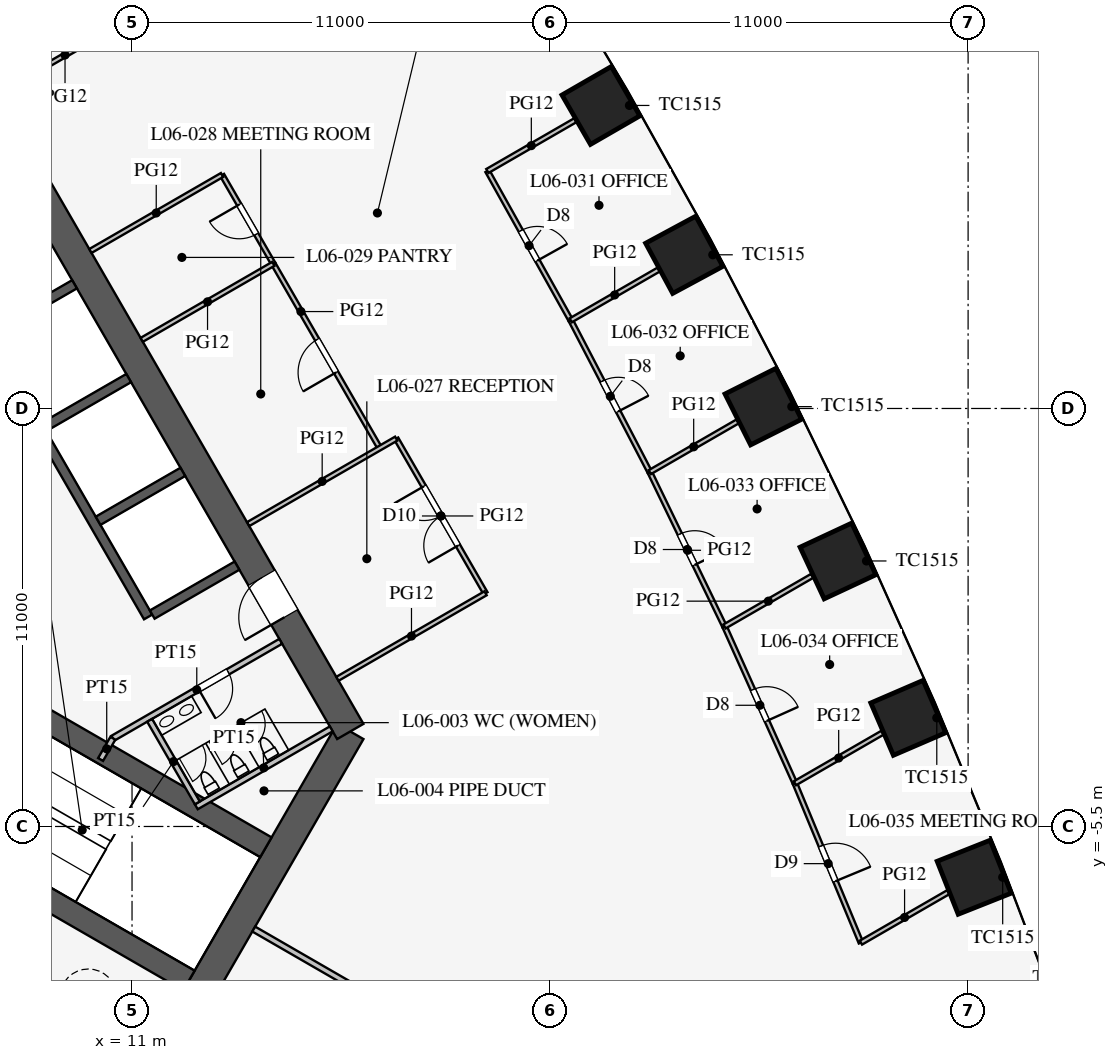
"""IFC4 building model, lengths in metres.
Left out: names, types, materials, properties, quantities, classifications, styles, units other than length and angle.
Written with IfcOpenShell. Run it as: python <this file> out.ifc"""

import sys

from ifc_helpers import new_model, si_unit, direction, frame, frame_2d, origin, origin_2d, place, context, subcontext, project, spatial, rectangle, extrude, element, fill, save


model = new_model("IFC4")
c1 = context("Model", 3, precision=1e-05, world=origin(), true_north=direction((0.0, 1.0)))
c2 = subcontext(c1, "Body", "Model", "MODEL_VIEW")
j1 = project(units=[si_unit("LENGTHUNIT", "METRE"), si_unit("PLANEANGLEUNIT", "RADIAN")], contexts=[c1])
p1 = place(None, origin())
s1 = spatial("IfcSite", under=j1, at=p1, CompositionType="ELEMENT")
p2 = place(p1, origin())
s2 = spatial("IfcBuilding", under=s1, at=p2, CompositionType="ELEMENT")
p3 = place(p2, frame((0.0, 0.0, 29.1)))
s3 = spatial("IfcBuildingStorey", under=s2, at=p3, CompositionType="ELEMENT", Elevation=29.1)
for number, where, z_axis, x_axis in (
    (1, (33.16, -6.836, 0.0), (0.0, 0.0, 1.0), (-0.369, 0.929, 0.0)),
    (2, (31.426, -2.641, 0.0), (0.0, 0.0, 1.0), (-0.396, 0.918, 0.0)),
    (3, (29.576, 1.487, 0.0), (0.0, 0.0, 1.0), (-0.423, 0.906, 0.0)),
    (4, (27.611, 5.549, 0.0), (0.0, 0.0, 1.0), (-0.449, 0.894, 0.0)),
    (5, (25.531, 9.544, 0.0), (0.0, 0.0, 1.0), (-0.475, 0.88, 0.0)),
    (6, (23.338, 13.474, 0.0), (0.0, 0.0, 1.0), (-0.5, 0.866, 0.0)),
):
    element("IfcColumn", number, at=place(p3, frame(where, z_axis=z_axis, x_axis=x_axis)), inside=s3, PredefinedType="COLUMN", context=c2, shape_type="SweptSolid", body=[
        extrude(rectangle(XDim=1.5, YDim=1.5, at=origin_2d()), origin(), (0.0, 0.0, 1.0), 4.2),
    ])
p4 = place(p3, frame((10.97, -13.0, 0.0), z_axis=(0.0, 0.0, 1.0), x_axis=(0.499995765644, 0.866027848477, 0.0)))
e7 = element("IfcWall", 7, at=p4, inside=s3, PredefinedType="SHEAR", context=c2, shape_type="SweptSolid", body=[
    extrude(rectangle(XDim=11.547, YDim=0.8, at=frame_2d((5.773, 0.0))), origin(), (0.0, 0.0, 1.0), 4.2),
])
p5 = place(p3, frame((16.743, -3.0, 0.0), z_axis=(0.0, 0.0, 1.0), x_axis=(-0.500002442456, 0.866023993627, 0.0)))
e8 = element("IfcWall", 8, at=p5, inside=s3, PredefinedType="SHEAR", context=c2, shape_type="SweptSolid", body=[
    extrude(rectangle(XDim=21.939, YDim=0.8, at=frame_2d((10.97, 0.0))), origin(), (0.0, 0.0, 1.0), 4.2),
])
p6 = place(p5, frame((17.27, 0.0, 0.0)))
e9 = element("IfcOpeningElement", 9, at=p6, cuts=e8, PredefinedType="OPENING", context=c2, shape_type="SweptSolid", body=[
    extrude(rectangle(XDim=1.2, YDim=2.1, at=frame_2d((0.6, 1.05))), frame((0.0, 0.41, 0.0), z_axis=(0.0, -1.0, 0.0), x_axis=(1.0, 0.0, 0.0)), (0.0, 0.0, 1.0), 0.82),
])
p7 = place(p5, frame((3.47, 0.0, 0.0)))
e10 = element("IfcOpeningElement", 10, at=p7, cuts=e8, PredefinedType="OPENING", context=c2, shape_type="SweptSolid", body=[
    extrude(rectangle(XDim=1.2, YDim=2.1, at=frame_2d((0.6, 1.05))), frame((0.0, 0.41, 0.0), z_axis=(0.0, -1.0, 0.0), x_axis=(1.0, 0.0, 0.0)), (0.0, 0.0, 1.0), 0.82),
])
p8 = place(p3, frame((11.424, 0.014, 0.0), z_axis=(0.0, 0.0, 1.0), x_axis=(-0.500001763848, 0.866024385424, 0.0)))
e11 = element("IfcWall", 11, at=p8, inside=s3, PredefinedType="SHEAR", context=c2, shape_type="SweptSolid", body=[
    extrude(rectangle(XDim=11.4, YDim=0.25, at=frame_2d((5.7, 0.0))), origin(), (0.0, 0.0, 1.0), 4.2),
])
for number, where, z_axis, x_axis in (
    (12, (11.532, 0.076, 0.0), (0.0, 0.0, 1.0), (0.866, 0.5, 0.0)),
    (13, (10.107, 2.544, 0.0), (0.0, 0.0, 1.0), (0.866, 0.5, 0.0)),
    (14, (8.682, 5.012, 0.0), (0.0, 0.0, 1.0), (0.866, 0.5, 0.0)),
    (15, (7.257, 7.481, 0.0), (0.0, 0.0, 1.0), (0.866, 0.5, 0.0)),
):
    element("IfcWall", number, at=place(p3, frame(where, z_axis=z_axis, x_axis=x_axis)), inside=s3, PredefinedType="SHEAR", context=c2, shape_type="SweptSolid", body=[
        extrude(rectangle(XDim=2.575, YDim=0.25, at=frame_2d((1.288, 0.0))), origin(), (0.0, 0.0, 1.0), 4.2),
    ])
for number, where, z_axis, x_axis in (
    (16, (4.638, -5.016, 0.0), (0.0, 0.0, 1.0), (0.866, -0.5, 0.0)),
    (17, (6.663, -1.509, 0.0), (0.0, 0.0, 1.0), (0.866, -0.5, 0.0)),
):
    element("IfcWall", number, at=place(p3, frame(where, z_axis=z_axis, x_axis=x_axis)), inside=s3, PredefinedType="SHEAR", context=c2, shape_type="SweptSolid", body=[
        extrude(rectangle(XDim=9.075, YDim=0.6, at=frame_2d((4.538, 0.0))), origin(), (0.0, 0.0, 1.0), 4.2),
    ])
p9 = place(p3, frame((10.495, -3.178, 0.0), z_axis=(0.0, 0.0, 1.0), x_axis=(0.86602216432, 0.500005610874, 0.0)))
e18 = element("IfcWall", 18, at=p9, inside=s3, PredefinedType="PARTITIONING", context=c2, shape_type="SweptSolid", body=[
    extrude(rectangle(XDim=5.1, YDim=0.15, at=frame_2d((2.55, 0.0))), origin(), (0.0, 0.0, 1.0), 4.0),
])
p10 = place(p9, frame((2.6, 0.0, 0.0)))
e19 = element("IfcOpeningElement", 19, at=p10, cuts=e18, PredefinedType="OPENING", context=c2, shape_type="SweptSolid", body=[
    extrude(rectangle(XDim=0.9, YDim=2.1, at=frame_2d((0.45, 1.05))), frame((0.0, 0.085, 0.0), z_axis=(0.0, -1.0, 0.0), x_axis=(1.0, 0.0, 0.0)), (0.0, 0.0, 1.0), 0.17),
])
p11 = place(p3, frame((10.495, -3.178, 0.0), z_axis=(0.0, 0.0, 1.0), x_axis=(-0.499842556608, -0.866116284689, 0.0)))
e20 = element("IfcWall", 20, at=p11, inside=s3, PredefinedType="PARTITIONING", context=c2, shape_type="SweptSolid", body=[
    extrude(rectangle(XDim=0.645, YDim=0.15, at=frame_2d((0.323, 0.0))), origin(), (0.0, 0.0, 1.0), 4.0),
])
p12 = place(p3, frame((12.691, -4.982, 0.0), z_axis=(0.0, 0.0, 1.0), x_axis=(0.8660249478, 0.500000789788, 0.0)))
e21 = element("IfcWall", 21, at=p12, inside=s3, PredefinedType="PARTITIONING", context=c2, shape_type="SweptSolid", body=[
    extrude(rectangle(XDim=4.1, YDim=0.15, at=frame_2d((2.05, 0.0))), origin(), (0.0, 0.0, 1.0), 4.0),
])
p13 = place(p3, frame((11.464, -2.706, 0.0), z_axis=(0.0, 0.0, 1.0), x_axis=(0.50001992892, -0.866013897511, 0.0)))
e22 = element("IfcWall", 22, at=p13, inside=s3, PredefinedType="PARTITIONING", context=c2, shape_type="SweptSolid", body=[
    extrude(rectangle(XDim=2.51, YDim=0.15, at=frame_2d((1.255, 0.0))), origin(), (0.0, 0.0, 1.0), 4.0),
])
p14 = place(p3, frame((14.203, -8.2, 0.0), z_axis=(0.0, 0.0, 1.0), x_axis=(0.866024965723, -0.500000758745, 0.0)))
e23 = element("IfcWall", 23, at=p14, inside=s3, PredefinedType="PARTITIONING", context=c2, shape_type="SweptSolid", body=[
    extrude(rectangle(XDim=18.25, YDim=0.15, at=frame_2d((9.125, 0.0))), origin(), (0.0, 0.0, 1.0), 2.3),
])
p15 = place(p3, frame((14.719, 9.306, 0.0), z_axis=(0.0, 0.0, 1.0), x_axis=(-0.4999416173, 0.866059108428, 0.0)))
e24 = element("IfcWall", 24, at=p15, inside=s3, PredefinedType="PARTITIONING", context=c2, shape_type="SweptSolid", body=[
    extrude(rectangle(XDim=2.7, YDim=0.12, at=frame_2d((1.35, 0.0))), origin(), (0.0, 0.0, 1.0), 2.9),
])
p16 = place(p15, frame((0.9, 0.0, 0.15)))
e25 = element("IfcOpeningElement", 25, at=p16, cuts=e24, PredefinedType="OPENING", context=c2, shape_type="SweptSolid", body=[
    extrude(rectangle(XDim=0.9, YDim=2.1, at=frame_2d((0.45, 1.05))), frame((0.0, 0.07, 0.0), z_axis=(0.0, -1.0, 0.0), x_axis=(1.0, 0.0, 0.0)), (0.0, 0.0, 1.0), 0.14),
])
p17 = place(p3, frame((17.519, 4.457, 0.0), z_axis=(0.0, 0.0, 1.0), x_axis=(-0.500016814911, 0.866015695474, 0.0)))
e26 = element("IfcWall", 26, at=p17, inside=s3, PredefinedType="PARTITIONING", context=c2, shape_type="SweptSolid", body=[
    extrude(rectangle(XDim=5.6, YDim=0.12, at=frame_2d((2.8, 0.0))), origin(), (0.0, 0.0, 1.0), 2.9),
])
p18 = place(p17, frame((2.3, 0.0, 0.15)))
e27 = element("IfcOpeningElement", 27, at=p18, cuts=e26, PredefinedType="OPENING", context=c2, shape_type="SweptSolid", body=[
    extrude(rectangle(XDim=1.0, YDim=2.1, at=frame_2d((0.5, 1.05))), frame((0.0, 0.07, 0.0), z_axis=(0.0, -1.0, 0.0), x_axis=(1.0, 0.0, 0.0)), (0.0, 0.0, 1.0), 0.14),
])
p19 = place(p3, frame((20.302, 0.636, 0.0), z_axis=(0.0, 0.0, 1.0), x_axis=(-0.499977259774, 0.866038532462, 0.0)))
e28 = element("IfcWall", 28, at=p19, inside=s3, PredefinedType="PARTITIONING", context=c2, shape_type="SweptSolid", body=[
    extrude(rectangle(XDim=4.7, YDim=0.12, at=frame_2d((2.35, 0.0))), origin(), (0.0, 0.0, 1.0), 2.9),
])
p20 = place(p19, frame((1.45, 0.0, 0.15)))
e29 = element("IfcOpeningElement", 29, at=p20, cuts=e28, PredefinedType="OPENING", context=c2, shape_type="SweptSolid", body=[
    extrude(rectangle(XDim=1.8, YDim=2.1, at=frame_2d((0.9, 1.05))), frame((0.0, 0.07, 0.0), z_axis=(0.0, -1.0, 0.0), x_axis=(1.0, 0.0, 0.0)), (0.0, 0.0, 1.0), 0.14),
])
for number, where, z_axis, x_axis in (
    (30, (11.255, 7.306, 0.0), (0.0, 0.0, 1.0), (0.866, 0.5, 0.0)),
    (31, (9.905, 9.645, 0.0), (0.0, 0.0, 1.0), (0.866, 0.5, 0.0)),
    (32, (7.505, 13.802, 0.0), (0.0, 0.0, 1.0), (0.866, 0.5, 0.0)),
):
    element("IfcWall", number, at=place(p3, frame(where, z_axis=z_axis, x_axis=x_axis)), inside=s3, PredefinedType="PARTITIONING", context=c2, shape_type="SweptSolid", body=[
        extrude(rectangle(XDim=4.0, YDim=0.12, at=frame_2d((2.0, 0.0))), origin(), (0.0, 0.0, 1.0), 2.9),
    ])
p21 = place(p3, frame((14.055, 2.457, 0.0), z_axis=(0.0, 0.0, 1.0), x_axis=(0.866031096941, 0.499990139034, 0.0)))
e33 = element("IfcWall", 33, at=p21, inside=s3, PredefinedType="PARTITIONING", context=c2, shape_type="SweptSolid", body=[
    extrude(rectangle(XDim=4.5, YDim=0.12, at=frame_2d((2.25, 0.0))), origin(), (0.0, 0.0, 1.0), 2.9),
])
p22 = place(p3, frame((16.405, -1.614, 0.0), z_axis=(0.0, 0.0, 1.0), x_axis=(0.866017533419, 0.500013631625, 0.0)))
e34 = element("IfcWall", 34, at=p22, inside=s3, PredefinedType="PARTITIONING", context=c2, shape_type="SweptSolid", body=[
    extrude(rectangle(XDim=4.5, YDim=0.12, at=frame_2d((2.25, 0.0))), origin(), (0.0, 0.0, 1.0), 2.9),
])
p23 = place(p3, frame((26.591, -0.236, 0.0), z_axis=(0.0, 0.0, 1.0), x_axis=(-0.435857917556, 0.900015486369, 0.0)))
e35 = element("IfcWall", 35, at=p23, inside=s3, PredefinedType="PARTITIONING", context=c2, shape_type="SweptSolid", body=[
    extrude(rectangle(XDim=4.512, YDim=0.12, at=frame_2d((2.256, 0.0))), origin(), (0.0, 0.0, 1.0), 2.9),
])
p24 = place(p23, frame((1.8, 0.0, 0.15)))
e36 = element("IfcOpeningElement", 36, at=p24, cuts=e35, PredefinedType="OPENING", context=c2, shape_type="SweptSolid", body=[
    extrude(rectangle(XDim=0.9, YDim=2.1, at=frame_2d((0.45, 1.05))), frame((0.0, 0.07, 0.0), z_axis=(0.0, -1.0, 0.0), x_axis=(1.0, 0.0, 0.0)), (0.0, 0.0, 1.0), 0.14),
])
p25 = place(p3, frame((28.443, -4.363, 0.0), z_axis=(0.0, 0.0, 1.0), x_axis=(-0.409495979977, 0.912311921649, 0.0)))
e37 = element("IfcWall", 37, at=p25, inside=s3, PredefinedType="PARTITIONING", context=c2, shape_type="SweptSolid", body=[
    extrude(rectangle(XDim=4.523, YDim=0.12, at=frame_2d((2.262, 0.0))), origin(), (0.0, 0.0, 1.0), 2.9),
])
p26 = place(p25, frame((1.8, 0.0, 0.15)))
e38 = element("IfcOpeningElement", 38, at=p26, cuts=e37, PredefinedType="OPENING", context=c2, shape_type="SweptSolid", body=[
    extrude(rectangle(XDim=0.9, YDim=2.1, at=frame_2d((0.45, 1.05))), frame((0.0, 0.07, 0.0), z_axis=(0.0, -1.0, 0.0), x_axis=(1.0, 0.0, 0.0)), (0.0, 0.0, 1.0), 0.14),
])
p27 = place(p3, frame((30.179, -8.557, 0.0), z_axis=(0.0, 0.0, 1.0), x_axis=(-0.382594071331, 0.923916542001, 0.0)))
e39 = element("IfcWall", 39, at=p27, inside=s3, PredefinedType="PARTITIONING", context=c2, shape_type="SweptSolid", body=[
    extrude(rectangle(XDim=4.539, YDim=0.12, at=frame_2d((2.27, 0.0))), origin(), (0.0, 0.0, 1.0), 2.9),
])
p28 = place(p27, frame((1.75, 0.0, 0.15)))
e40 = element("IfcOpeningElement", 40, at=p28, cuts=e39, PredefinedType="OPENING", context=c2, shape_type="SweptSolid", body=[
    extrude(rectangle(XDim=1.0, YDim=2.1, at=frame_2d((0.5, 1.05))), frame((0.0, 0.07, 0.0), z_axis=(0.0, -1.0, 0.0), x_axis=(1.0, 0.0, 0.0)), (0.0, 0.0, 1.0), 0.14),
])
p29 = place(p3, frame((22.544, 7.82, 0.0), z_axis=(0.0, 0.0, 1.0), x_axis=(-0.487373854787, 0.873193406795, 0.0)))
e41 = element("IfcWall", 41, at=p29, inside=s3, PredefinedType="PARTITIONING", context=c2, shape_type="SweptSolid", body=[
    extrude(rectangle(XDim=4.5, YDim=0.12, at=frame_2d((2.25, 0.0))), origin(), (0.0, 0.0, 1.0), 2.9),
])
p30 = place(p29, frame((1.8, 0.0, 0.15)))
e42 = element("IfcOpeningElement", 42, at=p30, cuts=e41, PredefinedType="OPENING", context=c2, shape_type="SweptSolid", body=[
    extrude(rectangle(XDim=0.9, YDim=2.1, at=frame_2d((0.45, 1.05))), frame((0.0, 0.07, 0.0), z_axis=(0.0, -1.0, 0.0), x_axis=(1.0, 0.0, 0.0)), (0.0, 0.0, 1.0), 0.14),
])
p31 = place(p3, frame((24.624, 3.824, 0.0), z_axis=(0.0, 0.0, 1.0), x_axis=(-0.461810056307, 0.886978845235, 0.0)))
e43 = element("IfcWall", 43, at=p31, inside=s3, PredefinedType="PARTITIONING", context=c2, shape_type="SweptSolid", body=[
    extrude(rectangle(XDim=4.504, YDim=0.12, at=frame_2d((2.252, 0.0))), origin(), (0.0, 0.0, 1.0), 2.9),
])
p32 = place(p31, frame((1.8, 0.0, 0.15)))
e44 = element("IfcOpeningElement", 44, at=p32, cuts=e43, PredefinedType="OPENING", context=c2, shape_type="SweptSolid", body=[
    extrude(rectangle(XDim=0.9, YDim=2.1, at=frame_2d((0.45, 1.05))), frame((0.0, 0.07, 0.0), z_axis=(0.0, -1.0, 0.0), x_axis=(1.0, 0.0, 0.0)), (0.0, 0.0, 1.0), 0.14),
])
p33 = place(p3, frame((20.351, 11.749, 0.0), z_axis=(0.0, 0.0, 1.0), x_axis=(0.865989150234, 0.500062787734, 0.0)))
e45 = element("IfcWall", 45, at=p33, inside=s3, PredefinedType="PARTITIONING", context=c2, shape_type="SweptSolid", body=[
    extrude(rectangle(XDim=2.67, YDim=0.12, at=frame_2d((1.335, 0.0))), origin(), (0.0, 0.0, 1.0), 2.9),
])
p34 = place(p3, frame((26.591, -0.236, 0.0), z_axis=(0.0, 0.0, 1.0), x_axis=(0.866023818221, 0.500002746266, 0.0)))
e46 = element("IfcWall", 46, at=p34, inside=s3, PredefinedType="PARTITIONING", context=c2, shape_type="SweptSolid", body=[
    extrude(rectangle(XDim=2.664, YDim=0.12, at=frame_2d((1.332, 0.0))), origin(), (0.0, 0.0, 1.0), 2.9),
])
p35 = place(p3, frame((28.443, -4.363, 0.0), z_axis=(0.0, 0.0, 1.0), x_axis=(0.866031171652, 0.499990009627, 0.0)))
e47 = element("IfcWall", 47, at=p35, inside=s3, PredefinedType="PARTITIONING", context=c2, shape_type="SweptSolid", body=[
    extrude(rectangle(XDim=2.659, YDim=0.12, at=frame_2d((1.33, 0.0))), origin(), (0.0, 0.0, 1.0), 2.9),
])
p36 = place(p3, frame((30.179, -8.557, 0.0), z_axis=(0.0, 0.0, 1.0), x_axis=(0.866026229868, 0.499998569178, 0.0)))
e48 = element("IfcWall", 48, at=p36, inside=s3, PredefinedType="PARTITIONING", context=c2, shape_type="SweptSolid", body=[
    extrude(rectangle(XDim=2.653, YDim=0.12, at=frame_2d((1.327, 0.0))), origin(), (0.0, 0.0, 1.0), 2.9),
])
p37 = place(p3, frame((22.544, 7.82, 0.0), z_axis=(0.0, 0.0, 1.0), x_axis=(0.866022619654, 0.500004822225, 0.0)))
e49 = element("IfcWall", 49, at=p37, inside=s3, PredefinedType="PARTITIONING", context=c2, shape_type="SweptSolid", body=[
    extrude(rectangle(XDim=2.669, YDim=0.12, at=frame_2d((1.335, 0.0))), origin(), (0.0, 0.0, 1.0), 2.9),
])
p38 = place(p3, frame((24.624, 3.824, 0.0), z_axis=(0.0, 0.0, 1.0), x_axis=(0.866020974757, 0.500007671222, 0.0)))
e50 = element("IfcWall", 50, at=p38, inside=s3, PredefinedType="PARTITIONING", context=c2, shape_type="SweptSolid", body=[
    extrude(rectangle(XDim=2.667, YDim=0.12, at=frame_2d((1.334, 0.0))), origin(), (0.0, 0.0, 1.0), 2.9),
])
p39 = place(p10, frame((0.9, 0.0, 0.0), z_axis=(0.0, 0.0, 1.0), x_axis=(-1.0, 0.0, 0.0)))
e51 = element("IfcDoor", 51, at=p39, inside=s3, OperationType="SINGLE_SWING_RIGHT", PredefinedType="DOOR", context=c2, shape_type="SweptSolid", body=[
    extrude(rectangle(XDim=0.9, YDim=2.1, at=frame_2d((0.45, 1.05))), frame((0.0, 0.025, 0.0), z_axis=(0.0, -1.0, 0.0), x_axis=(1.0, 0.0, 0.0)), (0.0, 0.0, 1.0), 0.05),
])
fill(e19, e51)
p40 = place(p7, origin())
e52 = element("IfcDoor", 52, at=p40, inside=s3, OperationType="SINGLE_SWING_LEFT", PredefinedType="DOOR", context=c2, shape_type="SweptSolid", body=[
    extrude(rectangle(XDim=1.2, YDim=2.1, at=frame_2d((0.6, 1.05))), frame((0.0, 0.025, 0.0), z_axis=(0.0, -1.0, 0.0), x_axis=(1.0, 0.0, 0.0)), (0.0, 0.0, 1.0), 0.05),
])
fill(e10, e52)
p41 = place(p20, origin())
e53 = element("IfcDoor", 53, at=p41, inside=s3, OperationType="DOUBLE_DOOR_SINGLE_SWING", PredefinedType="DOOR", context=c2, shape_type="SweptSolid", body=[
    extrude(rectangle(XDim=1.8, YDim=2.1, at=frame_2d((0.9, 1.05))), frame((0.0, 0.025, 0.0), z_axis=(0.0, -1.0, 0.0), x_axis=(1.0, 0.0, 0.0)), (0.0, 0.0, 1.0), 0.05),
])
fill(e29, e53)
p42 = place(p18, origin())
e54 = element("IfcDoor", 54, at=p42, inside=s3, OperationType="SINGLE_SWING_LEFT", PredefinedType="DOOR", context=c2, shape_type="SweptSolid", body=[
    extrude(rectangle(XDim=1.0, YDim=2.1, at=frame_2d((0.5, 1.05))), frame((0.0, 0.025, 0.0), z_axis=(0.0, -1.0, 0.0), x_axis=(1.0, 0.0, 0.0)), (0.0, 0.0, 1.0), 0.05),
])
fill(e27, e54)
p43 = place(p16, origin())
e55 = element("IfcDoor", 55, at=p43, inside=s3, OperationType="SINGLE_SWING_RIGHT", PredefinedType="DOOR", context=c2, shape_type="SweptSolid", body=[
    extrude(rectangle(XDim=0.9, YDim=2.1, at=frame_2d((0.45, 1.05))), frame((0.0, 0.025, 0.0), z_axis=(0.0, -1.0, 0.0), x_axis=(1.0, 0.0, 0.0)), (0.0, 0.0, 1.0), 0.05),
])
fill(e25, e55)
p44 = place(p30, frame((0.9, 0.0, 0.0), z_axis=(0.0, 0.0, 1.0), x_axis=(-1.0, 0.0, 0.0)))
e56 = element("IfcDoor", 56, at=p44, inside=s3, OperationType="SINGLE_SWING_RIGHT", PredefinedType="DOOR", context=c2, shape_type="SweptSolid", body=[
    extrude(rectangle(XDim=0.9, YDim=2.1, at=frame_2d((0.45, 1.05))), frame((0.0, 0.025, 0.0), z_axis=(0.0, -1.0, 0.0), x_axis=(1.0, 0.0, 0.0)), (0.0, 0.0, 1.0), 0.05),
])
fill(e42, e56)
p45 = place(p32, frame((0.9, 0.0, 0.0), z_axis=(0.0, 0.0, 1.0), x_axis=(-1.0, 0.0, 0.0)))
e57 = element("IfcDoor", 57, at=p45, inside=s3, OperationType="SINGLE_SWING_RIGHT", PredefinedType="DOOR", context=c2, shape_type="SweptSolid", body=[
    extrude(rectangle(XDim=0.9, YDim=2.1, at=frame_2d((0.45, 1.05))), frame((0.0, 0.025, 0.0), z_axis=(0.0, -1.0, 0.0), x_axis=(1.0, 0.0, 0.0)), (0.0, 0.0, 1.0), 0.05),
])
fill(e44, e57)
p46 = place(p24, frame((0.9, 0.0, 0.0), z_axis=(0.0, 0.0, 1.0), x_axis=(-1.0, 0.0, 0.0)))
e58 = element("IfcDoor", 58, at=p46, inside=s3, OperationType="SINGLE_SWING_RIGHT", PredefinedType="DOOR", context=c2, shape_type="SweptSolid", body=[
    extrude(rectangle(XDim=0.9, YDim=2.1, at=frame_2d((0.45, 1.05))), frame((0.0, 0.025, 0.0), z_axis=(0.0, -1.0, 0.0), x_axis=(1.0, 0.0, 0.0)), (0.0, 0.0, 1.0), 0.05),
])
fill(e36, e58)
p47 = place(p26, frame((0.9, 0.0, 0.0), z_axis=(0.0, 0.0, 1.0), x_axis=(-1.0, 0.0, 0.0)))
e59 = element("IfcDoor", 59, at=p47, inside=s3, OperationType="SINGLE_SWING_RIGHT", PredefinedType="DOOR", context=c2, shape_type="SweptSolid", body=[
    extrude(rectangle(XDim=0.9, YDim=2.1, at=frame_2d((0.45, 1.05))), frame((0.0, 0.025, 0.0), z_axis=(0.0, -1.0, 0.0), x_axis=(1.0, 0.0, 0.0)), (0.0, 0.0, 1.0), 0.05),
])
fill(e38, e59)
p48 = place(p28, frame((1.0, 0.0, 0.0), z_axis=(0.0, 0.0, 1.0), x_axis=(-1.0, 0.0, 0.0)))
e60 = element("IfcDoor", 60, at=p48, inside=s3, OperationType="SINGLE_SWING_RIGHT", PredefinedType="DOOR", context=c2, shape_type="SweptSolid", body=[
    extrude(rectangle(XDim=1.0, YDim=2.1, at=frame_2d((0.5, 1.05))), frame((0.0, 0.025, 0.0), z_axis=(0.0, -1.0, 0.0), x_axis=(1.0, 0.0, 0.0)), (0.0, 0.0, 1.0), 0.05),
])
fill(e40, e60)
save(model, sys.argv[1])
